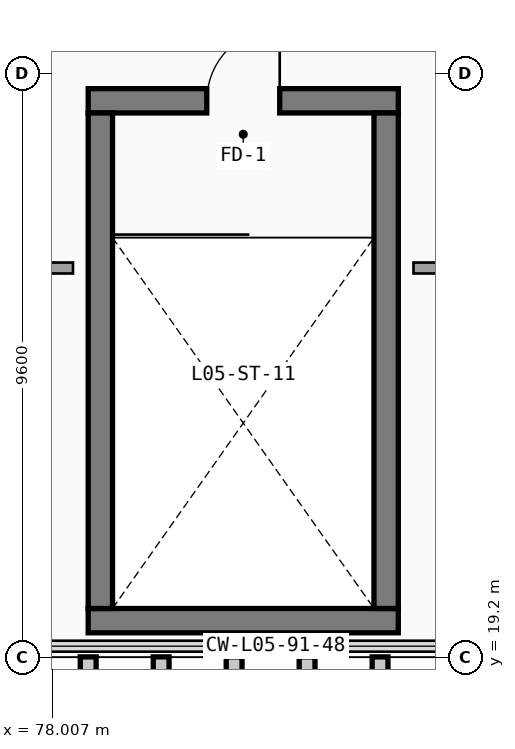
"""IFC4 building model, lengths in metres.
Left out: names, types, materials, properties, quantities, classifications, styles, units other than length and angle.
Written with IfcOpenShell. Run it as: python <this file> out.ifc"""

import sys

from ifc_helpers import new_model, si_unit, direction, frame, frame_2d, origin, place, context, subcontext, project, spatial, rectangle, extrude, element, fill, save


model = new_model("IFC4")
c1 = context("Model", 3, precision=1e-05, world=origin(), true_north=direction((0.0, 1.0)))
c2 = subcontext(c1, "Body", "Model", "MODEL_VIEW")
j1 = project(units=[si_unit("LENGTHUNIT", "METRE"), si_unit("PLANEANGLEUNIT", "RADIAN")], contexts=[c1])
p1 = place(None, origin())
s1 = spatial("IfcSite", under=j1, at=p1, CompositionType="ELEMENT")
p2 = place(p1, origin())
s2 = spatial("IfcBuilding", under=s1, at=p2, CompositionType="ELEMENT")
p3 = place(p2, frame((0.0, 0.0, 23.1)))
s3 = spatial("IfcBuildingStorey", under=s2, at=p3, CompositionType="ELEMENT", Elevation=23.1)
p4 = place(p3, frame((78.6, 19.8, 0.0), z_axis=(0.0, 0.0, 1.0), x_axis=(1.0, 0.0, 0.0)))
e1 = element("IfcWall", 1, at=p4, inside=s3, PredefinedType="SHEAR", context=c2, shape_type="SweptSolid", body=[
    extrude(rectangle(XDim=5.1, YDim=0.4, at=frame_2d((2.55, 0.0))), origin(), (0.0, 0.0, 1.0), 4.82),
])
p5 = place(p3, frame((83.7, 28.35, 0.0), z_axis=(0.0, 0.0, 1.0), x_axis=(-1.0, 0.0, 0.0)))
e2 = element("IfcWall", 2, at=p5, inside=s3, PredefinedType="SHEAR", context=c2, shape_type="SweptSolid", body=[
    extrude(rectangle(XDim=5.1, YDim=0.4, at=frame_2d((2.55, 0.0))), origin(), (0.0, 0.0, 1.0), 4.82),
])
p6 = place(p5, frame((3.15, 0.0, 0.0), z_axis=(0.0, 0.0, 1.0), x_axis=(-1.0, 0.0, 0.0)))
e3 = element("IfcOpeningElement", 3, at=p6, cuts=e2, PredefinedType="OPENING", context=c2, shape_type="SweptSolid", body=[
    extrude(rectangle(XDim=1.2, YDim=2.2, at=frame_2d((0.6, 1.1))), frame((0.0, 0.21, 0.0), z_axis=(0.0, -1.0, 0.0), x_axis=(1.0, 0.0, 0.0)), (0.0, 0.0, 1.0), 0.42),
])
for number, where, z_axis, x_axis in (
    (4, (78.8, 28.15, 0.0), (0.0, 0.0, 1.0), (0.0, -1.0, 0.0)),
    (5, (83.5, 20.0, 0.0), (0.0, 0.0, 1.0), (0.0, 1.0, 0.0)),
):
    element("IfcWall", number, at=place(p3, frame(where, z_axis=z_axis, x_axis=x_axis)), inside=s3, PredefinedType="SHEAR", context=c2, shape_type="SweptSolid", body=[
        extrude(rectangle(XDim=8.15, YDim=0.4, at=frame_2d((4.075, 0.0))), origin(), (0.0, 0.0, 1.0), 4.82),
    ])
p7 = place(p3, frame((87.62, 25.6, 0.0), z_axis=(0.0, 0.0, 1.0), x_axis=(-1.0, 0.0, 0.0)))
e6 = element("IfcWall", 6, at=p7, inside=s3, PredefinedType="PARTITIONING", context=c2, shape_type="SweptSolid", body=[
    extrude(rectangle(XDim=3.67, YDim=0.18, at=frame_2d((1.835, 0.0))), origin(), (0.0, 0.0, 1.0), 4.82),
])
p8 = place(p3, frame((78.35, 25.6, 0.0), z_axis=(0.0, 0.0, 1.0), x_axis=(-1.0, 0.0, 0.0)))
e7 = element("IfcWall", 7, at=p8, inside=s3, PredefinedType="PARTITIONING", context=c2, shape_type="SweptSolid", body=[
    extrude(rectangle(XDim=2.35, YDim=0.18, at=frame_2d((1.175, 0.0))), origin(), (0.0, 0.0, 1.0), 4.82),
])
p9 = place(p6, origin())
e8 = element("IfcDoor", 8, at=p9, inside=s3, OperationType="SINGLE_SWING_RIGHT", PredefinedType="DOOR", context=c2, shape_type="SweptSolid", body=[
    extrude(rectangle(XDim=1.2, YDim=2.2, at=frame_2d((0.6, 1.1))), frame((0.0, 0.025, 0.0), z_axis=(0.0, -1.0, 0.0), x_axis=(1.0, 0.0, 0.0)), (0.0, 0.0, 1.0), 0.05),
])
fill(e3, e8)
save(model, sys.argv[1])
